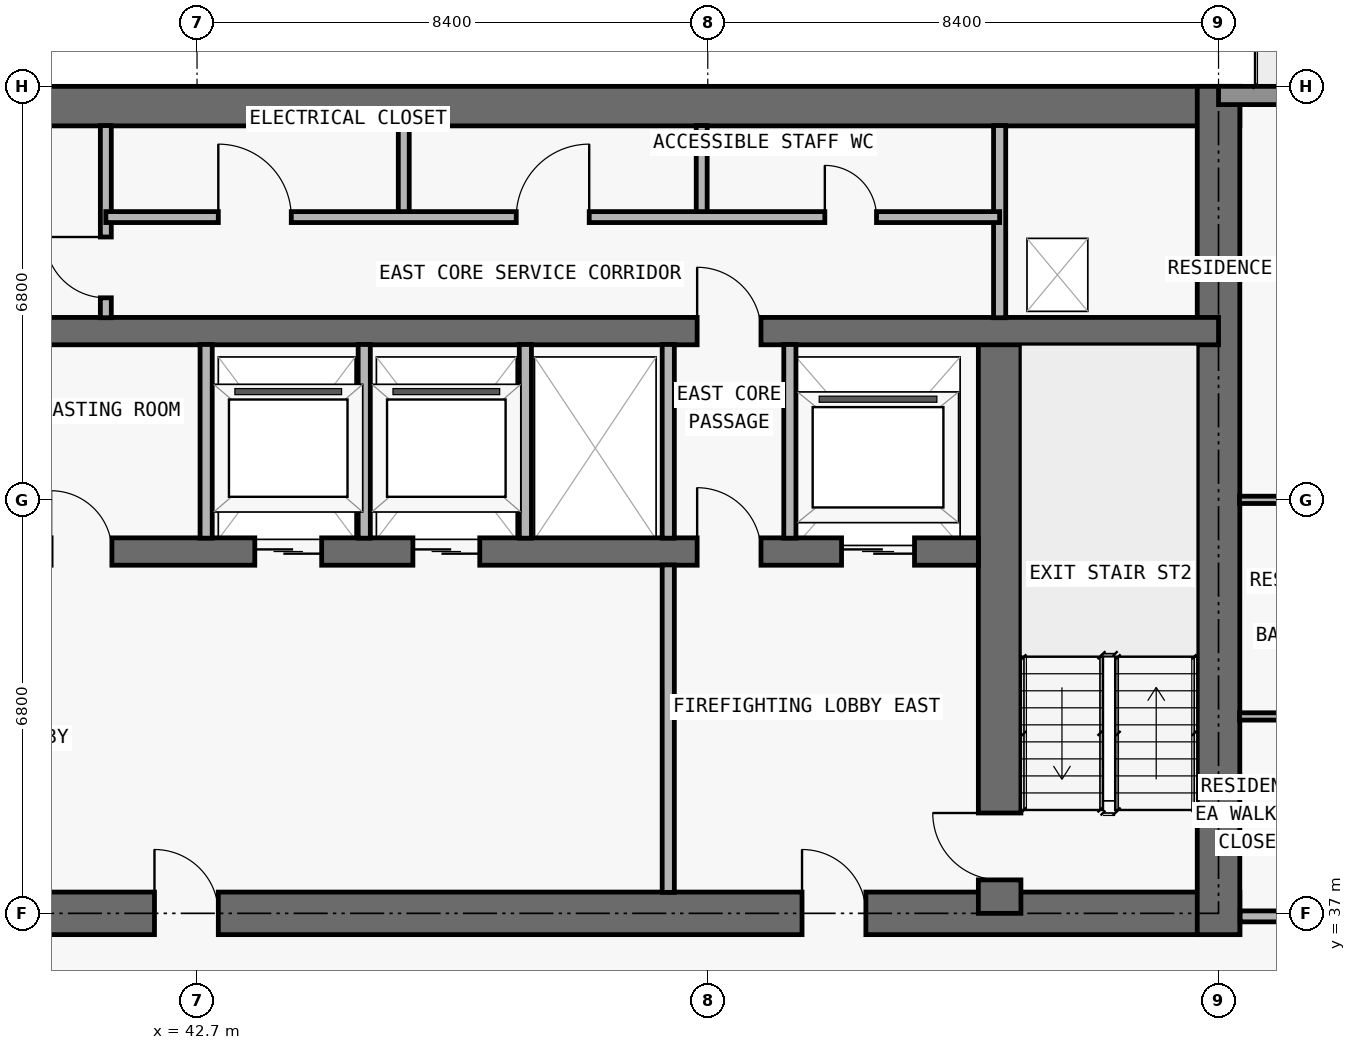
"""IFC4 building model, lengths in metres.
Left out: names, types, materials, properties, quantities, classifications, styles, units other than length and angle.
Written with IfcOpenShell. Run it as: python <this file> out.ifc"""

import sys

from ifc_helpers import new_model, si_unit, direction, frame, frame_2d, origin, place, context, subcontext, project, spatial, rectangle, extrude, element, fill, save


model = new_model("IFC4")
c1 = context("Model", 3, precision=1e-05, world=origin(), true_north=direction((0.0, 1.0)))
c2 = subcontext(c1, "Body", "Model", "MODEL_VIEW")
j1 = project(units=[si_unit("LENGTHUNIT", "METRE"), si_unit("PLANEANGLEUNIT", "RADIAN")], contexts=[c1])
p1 = place(None, origin())
s1 = spatial("IfcSite", under=j1, at=p1, CompositionType="ELEMENT")
p2 = place(p1, origin())
s2 = spatial("IfcBuilding", under=s1, at=p2, CompositionType="ELEMENT")
p3 = place(p2, frame((0.0, 0.0, 163.8)))
s3 = spatial("IfcBuildingStorey", under=s2, at=p3, CompositionType="ELEMENT", Elevation=163.8)
p4 = place(p3, frame((17.95, 37.0, 0.0), z_axis=(0.0, 0.0, 1.0), x_axis=(1.0, 0.0, 0.0)))
e1 = element("IfcWall", 1, at=p4, inside=s3, PredefinedType="SHEAR", context=c2, shape_type="SweptSolid", body=[
    extrude(rectangle(XDim=41.9, YDim=0.7, at=frame_2d((20.95, 0.0))), origin(), (0.0, 0.0, 1.0), 3.05),
])
p5 = place(p4, frame((14.35, 0.0, 0.0)))
e2 = element("IfcOpeningElement", 2, at=p5, cuts=e1, PredefinedType="OPENING", context=c2, shape_type="SweptSolid", body=[
    extrude(rectangle(XDim=1.1, YDim=2.15, at=frame_2d((0.55, 1.075))), frame((0.0, 0.36, 0.0), z_axis=(0.0, -1.0, 0.0), x_axis=(1.0, 0.0, 0.0)), (0.0, 0.0, 1.0), 0.72),
])
p6 = place(p4, frame((6.2, 0.0, 0.0)))
e3 = element("IfcOpeningElement", 3, at=p6, cuts=e1, PredefinedType="OPENING", context=c2, shape_type="SweptSolid", body=[
    extrude(rectangle(XDim=1.05, YDim=2.15, at=frame_2d((0.525, 1.075))), frame((0.0, 0.36, 0.0), z_axis=(0.0, -1.0, 0.0), x_axis=(1.0, 0.0, 0.0)), (0.0, 0.0, 1.0), 0.72),
])
p7 = place(p4, frame((34.7, 0.0, 0.0)))
e4 = element("IfcOpeningElement", 4, at=p7, cuts=e1, PredefinedType="OPENING", context=c2, shape_type="SweptSolid", body=[
    extrude(rectangle(XDim=1.05, YDim=2.15, at=frame_2d((0.525, 1.075))), frame((0.0, 0.36, 0.0), z_axis=(0.0, -1.0, 0.0), x_axis=(1.0, 0.0, 0.0)), (0.0, 0.0, 1.0), 0.72),
])
p8 = place(p4, frame((10.812, 0.0, 0.0)))
e5 = element("IfcOpeningElement", 5, at=p8, cuts=e1, PredefinedType="OPENING", context=c2, shape_type="SweptSolid", body=[
    extrude(rectangle(XDim=1.05, YDim=2.15, at=frame_2d((0.525, 1.075))), frame((0.0, 0.36, 0.0), z_axis=(0.0, -1.0, 0.0), x_axis=(1.0, 0.0, 0.0)), (0.0, 0.0, 1.0), 0.72),
])
p9 = place(p4, frame((24.05, 0.0, 0.0)))
e6 = element("IfcOpeningElement", 6, at=p9, cuts=e1, PredefinedType="OPENING", context=c2, shape_type="SweptSolid", body=[
    extrude(rectangle(XDim=1.05, YDim=2.15, at=frame_2d((0.525, 1.075))), frame((0.0, 0.36, 0.0), z_axis=(0.0, -1.0, 0.0), x_axis=(1.0, 0.0, 0.0)), (0.0, 0.0, 1.0), 0.72),
])
p10 = place(p3, frame((17.95, 50.275, 0.0), z_axis=(0.0, 0.0, 1.0), x_axis=(1.0, 0.0, 0.0)))
e7 = element("IfcWall", 7, at=p10, inside=s3, PredefinedType="SHEAR", context=c2, shape_type="SweptSolid", body=[
    extrude(rectangle(XDim=41.9, YDim=0.65, at=frame_2d((20.95, 0.0))), origin(), (0.0, 0.0, 1.0), 3.05),
])
p11 = place(p3, frame((59.5, 36.65, 0.0), z_axis=(0.0, 0.0, 1.0), x_axis=(0.0, 1.0, 0.0)))
e8 = element("IfcWall", 8, at=p11, inside=s3, PredefinedType="SHEAR", context=c2, shape_type="SweptSolid", body=[
    extrude(rectangle(XDim=13.95, YDim=0.7, at=frame_2d((6.975, 0.0))), origin(), (0.0, 0.0, 1.0), 3.05),
])
p12 = place(p3, frame((55.9, 37.0, 0.0), z_axis=(0.0, 0.0, 1.0), x_axis=(0.0, 1.0, 0.0)))
e9 = element("IfcWall", 9, at=p12, inside=s3, PredefinedType="SHEAR", context=c2, shape_type="SweptSolid", body=[
    extrude(rectangle(XDim=9.575, YDim=0.7, at=frame_2d((4.788, 0.0))), origin(), (0.0, 0.0, 1.0), 3.05),
])
p13 = place(p12, frame((0.55, 0.0, 0.0)))
e10 = element("IfcOpeningElement", 10, at=p13, cuts=e9, PredefinedType="OPENING", context=c2, shape_type="SweptSolid", body=[
    extrude(rectangle(XDim=1.1, YDim=2.15, at=frame_2d((0.55, 1.075))), frame((0.0, 0.36, 0.0), z_axis=(0.0, -1.0, 0.0), x_axis=(1.0, 0.0, 0.0)), (0.0, 0.0, 1.0), 0.72),
])
p14 = place(p3, frame((22.25, 42.95, 0.0), z_axis=(0.0, 0.0, 1.0), x_axis=(1.0, 0.0, 0.0)))
e11 = element("IfcWall", 11, at=p14, inside=s3, PredefinedType="SHEAR", context=c2, shape_type="SweptSolid", body=[
    extrude(rectangle(XDim=33.3, YDim=0.45, at=frame_2d((16.65, 0.0))), origin(), (0.0, 0.0, 1.0), 3.05),
])
p15 = place(p14, frame((1.05, 0.0, 0.0)))
e12 = element("IfcOpeningElement", 12, at=p15, cuts=e11, PredefinedType="OPENING", context=c2, shape_type="SweptSolid", body=[
    extrude(rectangle(XDim=1.2, YDim=2.2, at=frame_2d((0.6, 1.1))), frame((0.0, 0.235, 0.0), z_axis=(0.0, -1.0, 0.0), x_axis=(1.0, 0.0, 0.0)), (0.0, 0.0, 1.0), 0.47),
])
p16 = place(p14, frame((31.05, 0.0, 0.0)))
e13 = element("IfcOpeningElement", 13, at=p16, cuts=e11, PredefinedType="OPENING", context=c2, shape_type="SweptSolid", body=[
    extrude(rectangle(XDim=1.2, YDim=2.2, at=frame_2d((0.6, 1.1))), frame((0.0, 0.235, 0.0), z_axis=(0.0, -1.0, 0.0), x_axis=(1.0, 0.0, 0.0)), (0.0, 0.0, 1.0), 0.47),
])
p17 = place(p14, frame((21.4, 0.0, 0.0)))
e14 = element("IfcOpeningElement", 14, at=p17, cuts=e11, PredefinedType="OPENING", context=c2, shape_type="SweptSolid", body=[
    extrude(rectangle(XDim=1.1, YDim=2.2, at=frame_2d((0.55, 1.1))), frame((0.0, 0.235, 0.0), z_axis=(0.0, -1.0, 0.0), x_axis=(1.0, 0.0, 0.0)), (0.0, 0.0, 1.0), 0.47),
])
p18 = place(p14, frame((24.0, 0.0, 0.0)))
e15 = element("IfcOpeningElement", 15, at=p18, cuts=e11, PredefinedType="OPENING", context=c2, shape_type="SweptSolid", body=[
    extrude(rectangle(XDim=1.1, YDim=2.2, at=frame_2d((0.55, 1.1))), frame((0.0, 0.235, 0.0), z_axis=(0.0, -1.0, 0.0), x_axis=(1.0, 0.0, 0.0)), (0.0, 0.0, 1.0), 0.47),
])
p19 = place(p14, frame((3.625, 0.0, 0.0)))
e16 = element("IfcOpeningElement", 16, at=p19, cuts=e11, PredefinedType="OPENING", context=c2, shape_type="SweptSolid", body=[
    extrude(rectangle(XDim=1.05, YDim=2.15, at=frame_2d((0.525, 1.075))), frame((0.0, 0.235, 0.0), z_axis=(0.0, -1.0, 0.0), x_axis=(1.0, 0.0, 0.0)), (0.0, 0.0, 1.0), 0.47),
])
p20 = place(p14, frame((28.675, 0.0, 0.0)))
e17 = element("IfcOpeningElement", 17, at=p20, cuts=e11, PredefinedType="OPENING", context=c2, shape_type="SweptSolid", body=[
    extrude(rectangle(XDim=1.05, YDim=2.15, at=frame_2d((0.525, 1.075))), frame((0.0, 0.235, 0.0), z_axis=(0.0, -1.0, 0.0), x_axis=(1.0, 0.0, 0.0)), (0.0, 0.0, 1.0), 0.47),
])
p21 = place(p14, frame((13.925, 0.0, 0.0)))
e18 = element("IfcOpeningElement", 18, at=p21, cuts=e11, PredefinedType="OPENING", context=c2, shape_type="SweptSolid", body=[
    extrude(rectangle(XDim=1.0, YDim=2.2, at=frame_2d((0.5, 1.1))), frame((0.0, 0.235, 0.0), z_axis=(0.0, -1.0, 0.0), x_axis=(1.0, 0.0, 0.0)), (0.0, 0.0, 1.0), 0.47),
])
p22 = place(p14, frame((18.05, 0.0, 0.0)))
e19 = element("IfcOpeningElement", 19, at=p22, cuts=e11, PredefinedType="OPENING", context=c2, shape_type="SweptSolid", body=[
    extrude(rectangle(XDim=1.0, YDim=2.2, at=frame_2d((0.5, 1.1))), frame((0.0, 0.235, 0.0), z_axis=(0.0, -1.0, 0.0), x_axis=(1.0, 0.0, 0.0)), (0.0, 0.0, 1.0), 0.47),
])
p23 = place(p3, frame((18.3, 46.575, 0.0), z_axis=(0.0, 0.0, 1.0), x_axis=(1.0, 0.0, 0.0)))
e20 = element("IfcWall", 20, at=p23, inside=s3, PredefinedType="SHEAR", context=c2, shape_type="SweptSolid", body=[
    extrude(rectangle(XDim=41.2, YDim=0.45, at=frame_2d((20.6, 0.0))), origin(), (0.0, 0.0, 1.0), 3.05),
])
p24 = place(p23, frame((7.6, 0.0, 0.0)))
e21 = element("IfcOpeningElement", 21, at=p24, cuts=e20, PredefinedType="OPENING", context=c2, shape_type="SweptSolid", body=[
    extrude(rectangle(XDim=1.0, YDim=2.2, at=frame_2d((0.5, 1.1))), frame((0.0, 0.235, 0.0), z_axis=(0.0, -1.0, 0.0), x_axis=(1.0, 0.0, 0.0)), (0.0, 0.0, 1.0), 0.47),
])
p25 = place(p23, frame((32.625, 0.0, 0.0)))
e22 = element("IfcOpeningElement", 22, at=p25, cuts=e20, PredefinedType="OPENING", context=c2, shape_type="SweptSolid", body=[
    extrude(rectangle(XDim=1.05, YDim=2.15, at=frame_2d((0.525, 1.075))), frame((0.0, 0.235, 0.0), z_axis=(0.0, -1.0, 0.0), x_axis=(1.0, 0.0, 0.0)), (0.0, 0.0, 1.0), 0.47),
])
p26 = place(p3, frame((59.5, 50.45, 0.0), z_axis=(0.0, 0.0, 1.0), x_axis=(1.0, 0.0, 0.0)))
e23 = element("IfcWall", 23, at=p26, inside=s3, PredefinedType="STANDARD", context=c2, shape_type="SweptSolid", body=[
    extrude(rectangle(XDim=8.2, YDim=0.3, at=frame_2d((4.1, 0.0))), origin(), (0.0, 0.0, 1.0), 3.05),
])
p27 = place(p26, frame((3.1, 0.0, 0.0)))
e24 = element("IfcOpeningElement", 24, at=p27, cuts=e23, PredefinedType="OPENING", context=c2, shape_type="SweptSolid", body=[
    extrude(rectangle(XDim=2.0, YDim=2.3, at=frame_2d((1.0, 1.15))), frame((0.0, 0.16, 0.0), z_axis=(0.0, -1.0, 0.0), x_axis=(1.0, 0.0, 0.0)), (0.0, 0.0, 1.0), 0.32),
])
p28 = place(p3, frame((41.2, 46.795, 0.0), z_axis=(0.0, 0.0, 1.0), x_axis=(0.0, 1.0, 0.0)))
e25 = element("IfcWall", 25, at=p28, inside=s3, PredefinedType="PARTITIONING", context=c2, shape_type="SweptSolid", body=[
    extrude(rectangle(XDim=3.16, YDim=0.18, at=frame_2d((1.58, 0.0))), origin(), (0.0, 0.0, 1.0), 3.05),
])
p29 = place(p28, frame((0.327, 0.0, 0.0)))
e26 = element("IfcOpeningElement", 26, at=p29, cuts=e25, PredefinedType="OPENING", context=c2, shape_type="SweptSolid", body=[
    extrude(rectangle(XDim=1.0, YDim=2.2, at=frame_2d((0.5, 1.1))), frame((0.0, 0.1, 0.0), z_axis=(0.0, -1.0, 0.0), x_axis=(1.0, 0.0, 0.0)), (0.0, 0.0, 1.0), 0.2),
])
for number, where, z_axis, x_axis in (
    (27, (42.85, 43.17, 0.0), (0.0, 0.0, 1.0), (0.0, 1.0, 0.0)),
    (28, (45.45, 43.17, 0.0), (0.0, 0.0, 1.0), (0.0, 1.0, 0.0)),
):
    element("IfcWall", number, at=place(p3, frame(where, z_axis=z_axis, x_axis=x_axis)), inside=s3, PredefinedType="PARTITIONING", context=c2, shape_type="SweptSolid", body=[
        extrude(rectangle(XDim=3.185, YDim=0.2, at=frame_2d((1.593, 0.0))), origin(), (0.0, 0.0, 1.0), 3.05),
    ])
p30 = place(p3, frame((46.1, 48.45, 0.0), z_axis=(0.0, 0.0, 1.0), x_axis=(0.0, 1.0, 0.0)))
e29 = element("IfcWall", 29, at=p30, inside=s3, PredefinedType="PARTITIONING", context=c2, shape_type="SweptSolid", body=[
    extrude(rectangle(XDim=1.505, YDim=0.18, at=frame_2d((0.752, 0.0))), origin(), (0.0, 0.0, 1.0), 3.05),
])
p31 = place(p3, frame((48.1, 43.17, 0.0), z_axis=(0.0, 0.0, 1.0), x_axis=(0.0, 1.0, 0.0)))
e30 = element("IfcWall", 30, at=p31, inside=s3, PredefinedType="PARTITIONING", context=c2, shape_type="SweptSolid", body=[
    extrude(rectangle(XDim=3.185, YDim=0.2, at=frame_2d((1.593, 0.0))), origin(), (0.0, 0.0, 1.0), 3.05),
])
p32 = place(p3, frame((50.45, 37.345, 0.0), z_axis=(0.0, 0.0, 1.0), x_axis=(0.0, 1.0, 0.0)))
e31 = element("IfcWall", 31, at=p32, inside=s3, PredefinedType="PARTITIONING", context=c2, shape_type="SweptSolid", body=[
    extrude(rectangle(XDim=5.385, YDim=0.2, at=frame_2d((2.692, 0.0))), origin(), (0.0, 0.0, 1.0), 3.05),
])
p33 = place(p3, frame((50.45, 43.17, 0.0), z_axis=(0.0, 0.0, 1.0), x_axis=(0.0, 1.0, 0.0)))
e32 = element("IfcWall", 32, at=p33, inside=s3, PredefinedType="PARTITIONING", context=c2, shape_type="SweptSolid", body=[
    extrude(rectangle(XDim=3.185, YDim=0.2, at=frame_2d((1.593, 0.0))), origin(), (0.0, 0.0, 1.0), 3.05),
])
p34 = place(p3, frame((51.0, 48.45, 0.0), z_axis=(0.0, 0.0, 1.0), x_axis=(0.0, 1.0, 0.0)))
e33 = element("IfcWall", 33, at=p34, inside=s3, PredefinedType="PARTITIONING", context=c2, shape_type="SweptSolid", body=[
    extrude(rectangle(XDim=1.505, YDim=0.18, at=frame_2d((0.752, 0.0))), origin(), (0.0, 0.0, 1.0), 3.05),
])
p35 = place(p3, frame((52.45, 43.17, 0.0), z_axis=(0.0, 0.0, 1.0), x_axis=(0.0, 1.0, 0.0)))
e34 = element("IfcWall", 34, at=p35, inside=s3, PredefinedType="PARTITIONING", context=c2, shape_type="SweptSolid", body=[
    extrude(rectangle(XDim=3.185, YDim=0.2, at=frame_2d((1.593, 0.0))), origin(), (0.0, 0.0, 1.0), 3.05),
])
p36 = place(p3, frame((55.9, 46.795, 0.0), z_axis=(0.0, 0.0, 1.0), x_axis=(0.0, 1.0, 0.0)))
e35 = element("IfcWall", 35, at=p36, inside=s3, PredefinedType="PARTITIONING", context=c2, shape_type="SweptSolid", body=[
    extrude(rectangle(XDim=3.16, YDim=0.2, at=frame_2d((1.58, 0.0))), origin(), (0.0, 0.0, 1.0), 3.05),
])
p37 = place(p3, frame((59.855, 36.95, 0.0), z_axis=(0.0, 0.0, 1.0), x_axis=(1.0, 0.0, 0.0)))
e36 = element("IfcWall", 36, at=p37, inside=s3, PredefinedType="PARTITIONING", context=c2, shape_type="SweptSolid", body=[
    extrude(rectangle(XDim=7.845, YDim=0.18, at=frame_2d((3.922, 0.0))), origin(), (0.0, 0.0, 1.0), 3.05),
])
p38 = place(p37, frame((3.385, 0.0, 0.0)))
e37 = element("IfcOpeningElement", 37, at=p38, cuts=e36, PredefinedType="OPENING", context=c2, shape_type="SweptSolid", body=[
    extrude(rectangle(XDim=1.0, YDim=2.2, at=frame_2d((0.5, 1.1))), frame((0.0, 0.1, 0.0), z_axis=(0.0, -1.0, 0.0), x_axis=(1.0, 0.0, 0.0)), (0.0, 0.0, 1.0), 0.2),
])
p39 = place(p3, frame((59.845, 40.238, 0.0), z_axis=(0.0, 0.0, 1.0), x_axis=(1.0, 0.0, 0.0)))
e38 = element("IfcWall", 38, at=p39, inside=s3, PredefinedType="PARTITIONING", context=c2, shape_type="SweptSolid", body=[
    extrude(rectangle(XDim=2.355, YDim=0.12, at=frame_2d((1.177, 0.0))), origin(), (0.0, 0.0, 1.0), 3.05),
])
p40 = place(p3, frame((59.845, 43.8, 0.0), z_axis=(0.0, 0.0, 1.0), x_axis=(1.0, 0.0, 0.0)))
e39 = element("IfcWall", 39, at=p40, inside=s3, PredefinedType="PARTITIONING", context=c2, shape_type="SweptSolid", body=[
    extrude(rectangle(XDim=11.56, YDim=0.12, at=frame_2d((5.78, 0.0))), origin(), (0.0, 0.0, 1.0), 2.418),
])
p41 = place(p40, frame((3.445, 0.0, 0.0)))
e40 = element("IfcOpeningElement", 40, at=p41, cuts=e39, PredefinedType="OPENING", context=c2, shape_type="SweptSolid", body=[
    extrude(rectangle(XDim=0.9, YDim=2.15, at=frame_2d((0.45, 1.075))), frame((0.0, 0.07, 0.0), z_axis=(0.0, -1.0, 0.0), x_axis=(1.0, 0.0, 0.0)), (0.0, 0.0, 1.0), 0.14),
])
p42 = place(p40, frame((0.752, 0.0, 0.0)))
e41 = element("IfcOpeningElement", 41, at=p42, cuts=e39, PredefinedType="OPENING", context=c2, shape_type="SweptSolid", body=[
    extrude(rectangle(XDim=0.85, YDim=2.1, at=frame_2d((0.425, 1.05))), frame((0.0, 0.07, 0.0), z_axis=(0.0, -1.0, 0.0), x_axis=(1.0, 0.0, 0.0)), (0.0, 0.0, 1.0), 0.14),
])
p43 = place(p3, frame((41.2, 48.45, 0.0), z_axis=(0.0, 0.0, 1.0), x_axis=(1.0, 0.0, 0.0)))
e42 = element("IfcWall", 42, at=p43, inside=s3, PredefinedType="PARTITIONING", context=c2, shape_type="SweptSolid", body=[
    extrude(rectangle(XDim=14.7, YDim=0.18, at=frame_2d((7.35, 0.0))), origin(), (0.0, 0.0, 1.0), 3.05),
])
p44 = place(p43, frame((1.85, 0.0, 0.0)))
e43 = element("IfcOpeningElement", 43, at=p44, cuts=e42, PredefinedType="OPENING", context=c2, shape_type="SweptSolid", body=[
    extrude(rectangle(XDim=1.2, YDim=2.2, at=frame_2d((0.6, 1.1))), frame((0.0, 0.1, 0.0), z_axis=(0.0, -1.0, 0.0), x_axis=(1.0, 0.0, 0.0)), (0.0, 0.0, 1.0), 0.2),
])
p45 = place(p43, frame((6.75, 0.0, 0.0)))
e44 = element("IfcOpeningElement", 44, at=p45, cuts=e42, PredefinedType="OPENING", context=c2, shape_type="SweptSolid", body=[
    extrude(rectangle(XDim=1.2, YDim=2.2, at=frame_2d((0.6, 1.1))), frame((0.0, 0.1, 0.0), z_axis=(0.0, -1.0, 0.0), x_axis=(1.0, 0.0, 0.0)), (0.0, 0.0, 1.0), 0.2),
])
p46 = place(p43, frame((11.825, 0.0, 0.0)))
e45 = element("IfcOpeningElement", 45, at=p46, cuts=e42, PredefinedType="OPENING", context=c2, shape_type="SweptSolid", body=[
    extrude(rectangle(XDim=0.85, YDim=2.1, at=frame_2d((0.425, 1.05))), frame((0.0, 0.1, 0.0), z_axis=(0.0, -1.0, 0.0), x_axis=(1.0, 0.0, 0.0)), (0.0, 0.0, 1.0), 0.2),
])
p47 = place(p16, origin())
e46 = element("IfcDoor", 46, at=p47, inside=s3, OperationType="DOUBLE_DOOR_SLIDING", PredefinedType="DOOR", context=c2, shape_type="SweptSolid", body=[
    extrude(rectangle(XDim=1.2, YDim=2.2, at=frame_2d((0.6, 1.1))), frame((0.0, 0.025, 0.0), z_axis=(0.0, -1.0, 0.0), x_axis=(1.0, 0.0, 0.0)), (0.0, 0.0, 1.0), 0.05),
])
fill(e13, e46)
p48 = place(p17, origin())
e47 = element("IfcDoor", 47, at=p48, inside=s3, OperationType="DOUBLE_DOOR_SLIDING", PredefinedType="DOOR", context=c2, shape_type="SweptSolid", body=[
    extrude(rectangle(XDim=1.1, YDim=2.2, at=frame_2d((0.55, 1.1))), frame((0.0, 0.025, 0.0), z_axis=(0.0, -1.0, 0.0), x_axis=(1.0, 0.0, 0.0)), (0.0, 0.0, 1.0), 0.05),
])
fill(e14, e47)
p49 = place(p18, origin())
e48 = element("IfcDoor", 48, at=p49, inside=s3, OperationType="DOUBLE_DOOR_SLIDING", PredefinedType="DOOR", context=c2, shape_type="SweptSolid", body=[
    extrude(rectangle(XDim=1.1, YDim=2.2, at=frame_2d((0.55, 1.1))), frame((0.0, 0.025, 0.0), z_axis=(0.0, -1.0, 0.0), x_axis=(1.0, 0.0, 0.0)), (0.0, 0.0, 1.0), 0.05),
])
fill(e15, e48)
p50 = place(p7, origin())
e49 = element("IfcDoor", 49, at=p50, inside=s3, OperationType="SINGLE_SWING_LEFT", PredefinedType="DOOR", context=c2, shape_type="SweptSolid", body=[
    extrude(rectangle(XDim=1.05, YDim=2.15, at=frame_2d((0.525, 1.075))), frame((0.0, 0.025, 0.0), z_axis=(0.0, -1.0, 0.0), x_axis=(1.0, 0.0, 0.0)), (0.0, 0.0, 1.0), 0.05),
])
fill(e4, e49)
p51 = place(p13, origin())
e50 = element("IfcDoor", 50, at=p51, inside=s3, OperationType="SINGLE_SWING_RIGHT", PredefinedType="DOOR", context=c2, shape_type="SweptSolid", body=[
    extrude(rectangle(XDim=1.1, YDim=2.15, at=frame_2d((0.55, 1.075))), frame((0.0, 0.025, 0.0), z_axis=(0.0, -1.0, 0.0), x_axis=(1.0, 0.0, 0.0)), (0.0, 0.0, 1.0), 0.05),
])
fill(e10, e50)
p52 = place(p20, origin())
e51 = element("IfcDoor", 51, at=p52, inside=s3, OperationType="SINGLE_SWING_LEFT", PredefinedType="DOOR", context=c2, shape_type="SweptSolid", body=[
    extrude(rectangle(XDim=1.05, YDim=2.15, at=frame_2d((0.525, 1.075))), frame((0.0, 0.025, 0.0), z_axis=(0.0, -1.0, 0.0), x_axis=(1.0, 0.0, 0.0)), (0.0, 0.0, 1.0), 0.05),
])
fill(e17, e51)
p53 = place(p9, origin())
e52 = element("IfcDoor", 52, at=p53, inside=s3, OperationType="SINGLE_SWING_LEFT", PredefinedType="DOOR", context=c2, shape_type="SweptSolid", body=[
    extrude(rectangle(XDim=1.05, YDim=2.15, at=frame_2d((0.525, 1.075))), frame((0.0, 0.025, 0.0), z_axis=(0.0, -1.0, 0.0), x_axis=(1.0, 0.0, 0.0)), (0.0, 0.0, 1.0), 0.05),
])
fill(e6, e52)
p54 = place(p22, origin())
e53 = element("IfcDoor", 53, at=p54, inside=s3, OperationType="SINGLE_SWING_LEFT", PredefinedType="DOOR", context=c2, shape_type="SweptSolid", body=[
    extrude(rectangle(XDim=1.0, YDim=2.2, at=frame_2d((0.5, 1.1))), frame((0.0, 0.025, 0.0), z_axis=(0.0, -1.0, 0.0), x_axis=(1.0, 0.0, 0.0)), (0.0, 0.0, 1.0), 0.05),
])
fill(e19, e53)
p55 = place(p25, origin())
e54 = element("IfcDoor", 54, at=p55, inside=s3, OperationType="SINGLE_SWING_LEFT", PredefinedType="DOOR", context=c2, shape_type="SweptSolid", body=[
    extrude(rectangle(XDim=1.05, YDim=2.15, at=frame_2d((0.525, 1.075))), frame((0.0, 0.025, 0.0), z_axis=(0.0, -1.0, 0.0), x_axis=(1.0, 0.0, 0.0)), (0.0, 0.0, 1.0), 0.05),
])
fill(e22, e54)
p56 = place(p29, origin())
e55 = element("IfcDoor", 55, at=p56, inside=s3, OperationType="SINGLE_SWING_RIGHT", PredefinedType="DOOR", context=c2, shape_type="SweptSolid", body=[
    extrude(rectangle(XDim=1.0, YDim=2.2, at=frame_2d((0.5, 1.1))), frame((0.0, 0.025, 0.0), z_axis=(0.0, -1.0, 0.0), x_axis=(1.0, 0.0, 0.0)), (0.0, 0.0, 1.0), 0.05),
])
fill(e26, e55)
p57 = place(p44, origin())
e56 = element("IfcDoor", 56, at=p57, inside=s3, OperationType="SINGLE_SWING_LEFT", PredefinedType="DOOR", context=c2, shape_type="SweptSolid", body=[
    extrude(rectangle(XDim=1.2, YDim=2.2, at=frame_2d((0.6, 1.1))), frame((0.0, 0.025, 0.0), z_axis=(0.0, -1.0, 0.0), x_axis=(1.0, 0.0, 0.0)), (0.0, 0.0, 1.0), 0.05),
])
fill(e43, e56)
p58 = place(p45, origin())
e57 = element("IfcDoor", 57, at=p58, inside=s3, OperationType="SINGLE_SWING_RIGHT", PredefinedType="DOOR", context=c2, shape_type="SweptSolid", body=[
    extrude(rectangle(XDim=1.2, YDim=2.2, at=frame_2d((0.6, 1.1))), frame((0.0, 0.025, 0.0), z_axis=(0.0, -1.0, 0.0), x_axis=(1.0, 0.0, 0.0)), (0.0, 0.0, 1.0), 0.05),
])
fill(e44, e57)
p59 = place(p46, origin())
e58 = element("IfcDoor", 58, at=p59, inside=s3, OperationType="SINGLE_SWING_LEFT", PredefinedType="DOOR", context=c2, shape_type="SweptSolid", body=[
    extrude(rectangle(XDim=0.85, YDim=2.1, at=frame_2d((0.425, 1.05))), frame((0.0, 0.025, 0.0), z_axis=(0.0, -1.0, 0.0), x_axis=(1.0, 0.0, 0.0)), (0.0, 0.0, 1.0), 0.05),
])
fill(e45, e58)
save(model, sys.argv[1])
